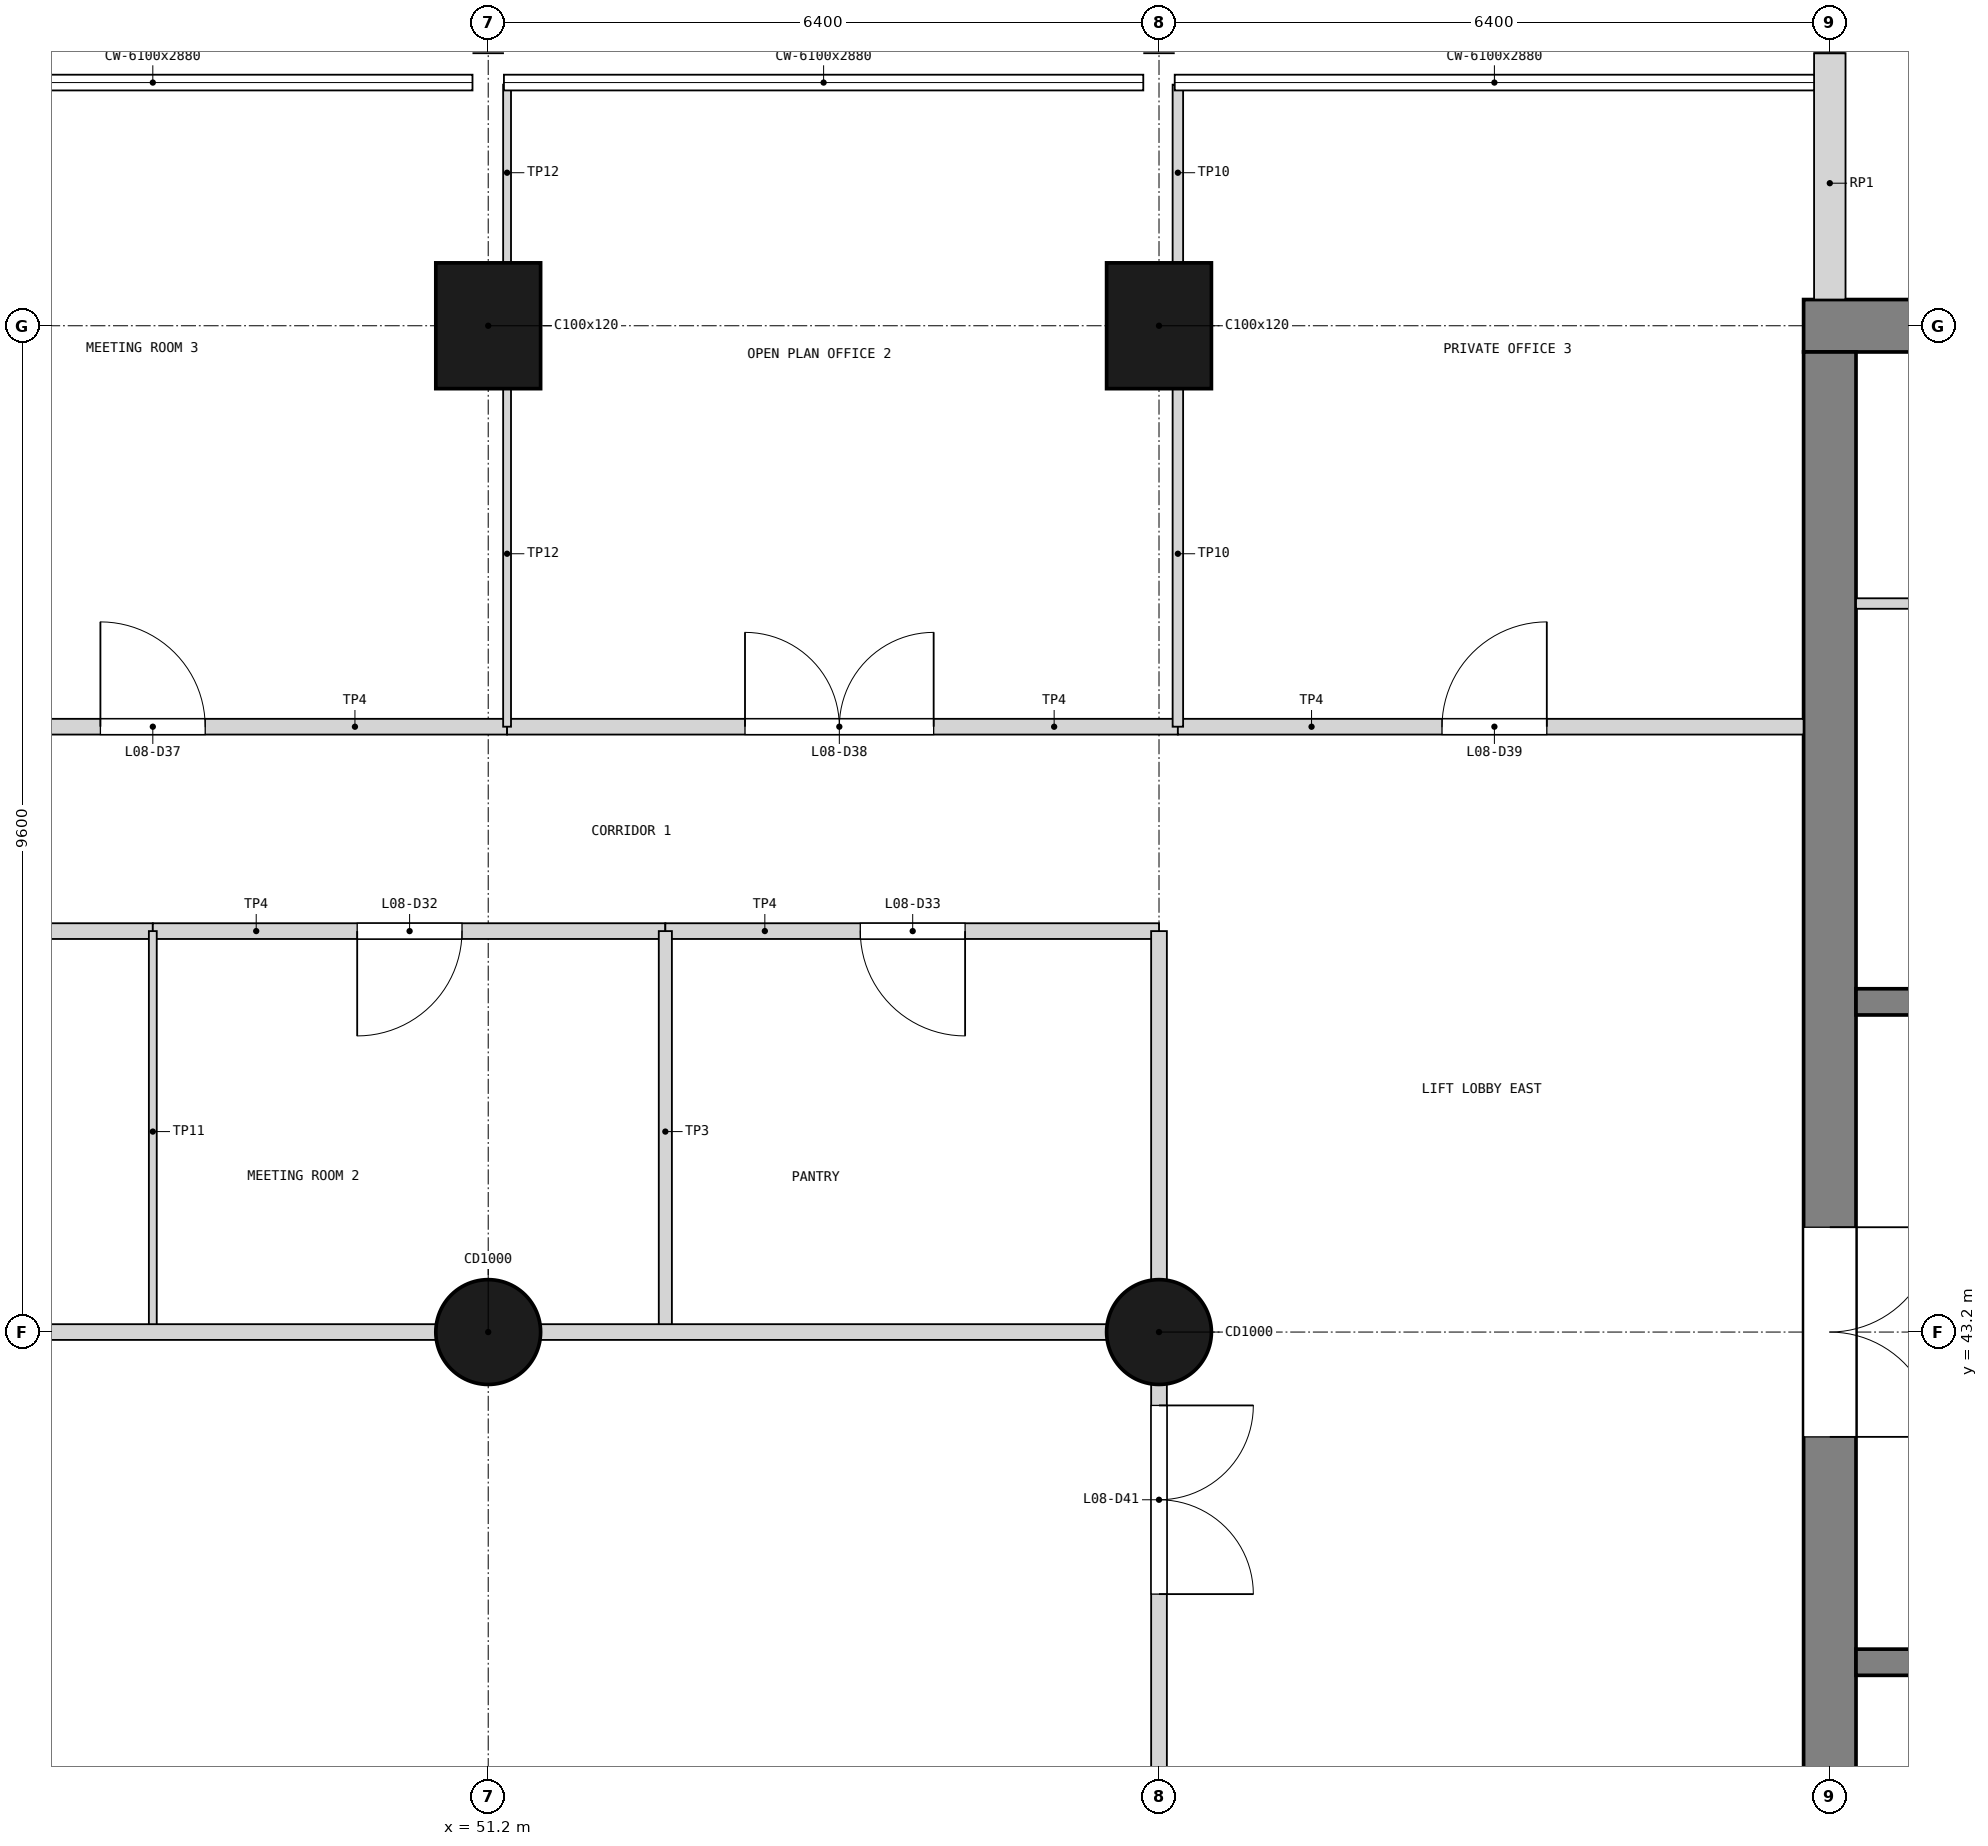
"""IFC4 building model, lengths in metres.
Left out: names, types, materials, properties, quantities, classifications, styles, units other than length and angle.
Written with IfcOpenShell. Run it as: python <this file> out.ifc"""

import sys

from ifc_helpers import new_model, si_unit, direction, frame, frame_2d, origin, origin_2d, place, context, subcontext, project, spatial, rectangle, circle, extrude, element, fill, save


model = new_model("IFC4")
c1 = context("Model", 3, precision=1e-05, world=origin(), true_north=direction((0.0, 1.0)))
c2 = subcontext(c1, "Body", "Model", "MODEL_VIEW")
j1 = project(units=[si_unit("LENGTHUNIT", "METRE"), si_unit("PLANEANGLEUNIT", "RADIAN")], contexts=[c1])
p1 = place(None, origin())
s1 = spatial("IfcSite", under=j1, at=p1, CompositionType="ELEMENT")
p2 = place(p1, origin())
s2 = spatial("IfcBuilding", under=s1, at=p2, CompositionType="ELEMENT")
p3 = place(p2, frame((0.0, 0.0, 32.7)))
s3 = spatial("IfcBuildingStorey", under=s2, at=p3, CompositionType="ELEMENT", Elevation=32.7)
p4 = place(p3, frame((63.75, 52.8, 0.0), z_axis=(0.0, 0.0, 1.0), x_axis=(1.0, 0.0, 0.0)))
e1 = element("IfcWall", 1, at=p4, inside=s3, PredefinedType="SHEAR", context=c2, shape_type="SweptSolid", body=[
    extrude(rectangle(XDim=13.3, YDim=0.5, at=frame_2d((6.65, 0.0))), origin(), (0.0, 0.0, 1.0), 3.9),
])
p5 = place(p4, frame((11.05, 0.0, 1.0)))
e2 = element("IfcOpeningElement", 2, at=p5, cuts=e1, PredefinedType="OPENING", context=c2, shape_type="SweptSolid", body=[
    extrude(rectangle(XDim=0.4, YDim=2.0, at=frame_2d((0.2, 1.0))), frame((0.0, 0.26, 0.0), z_axis=(0.0, -1.0, 0.0), x_axis=(1.0, 0.0, 0.0)), (0.0, 0.0, 1.0), 0.52),
])
p6 = place(p3, frame((64.0, 33.85, 0.0), z_axis=(0.0, 0.0, 1.0), x_axis=(0.0, 1.0, 0.0)))
e3 = element("IfcWall", 3, at=p6, inside=s3, PredefinedType="SHEAR", context=c2, shape_type="SweptSolid", body=[
    extrude(rectangle(XDim=18.7, YDim=0.5, at=frame_2d((9.35, 0.0))), origin(), (0.0, 0.0, 1.0), 3.9),
])
p7 = place(p6, frame((8.35, 0.0, 0.0)))
e4 = element("IfcOpeningElement", 4, at=p7, cuts=e3, PredefinedType="OPENING", context=c2, shape_type="SweptSolid", body=[
    extrude(rectangle(XDim=2.0, YDim=2.1, at=frame_2d((1.0, 1.05))), frame((0.0, 0.26, 0.0), z_axis=(0.0, -1.0, 0.0), x_axis=(1.0, 0.0, 0.0)), (0.0, 0.0, 1.0), 0.52),
])
p8 = place(p3, frame((51.2, 43.2, 0.0), z_axis=(0.0, 0.0, 1.0), x_axis=(1.0, 0.0, 0.0)))
e5 = element("IfcColumn", 5, at=p8, inside=s3, PredefinedType="COLUMN", context=c2, shape_type="SweptSolid", body=[
    extrude(circle(Radius=0.5, at=origin_2d()), origin(), (0.0, 0.0, 1.0), 3.9),
])
p9 = place(p3, frame((51.2, 52.8, 0.0), z_axis=(0.0, 0.0, 1.0), x_axis=(1.0, 0.0, 0.0)))
e6 = element("IfcColumn", 6, at=p9, inside=s3, PredefinedType="COLUMN", context=c2, shape_type="SweptSolid", body=[
    extrude(rectangle(XDim=1.0, YDim=1.2, at=origin_2d()), origin(), (0.0, 0.0, 1.0), 3.9),
])
p10 = place(p3, frame((57.6, 43.2, 0.0), z_axis=(0.0, 0.0, 1.0), x_axis=(1.0, 0.0, 0.0)))
e7 = element("IfcColumn", 7, at=p10, inside=s3, PredefinedType="COLUMN", context=c2, shape_type="SweptSolid", body=[
    extrude(circle(Radius=0.5, at=origin_2d()), origin(), (0.0, 0.0, 1.0), 3.9),
])
p11 = place(p3, frame((57.6, 52.8, 0.0), z_axis=(0.0, 0.0, 1.0), x_axis=(1.0, 0.0, 0.0)))
e8 = element("IfcColumn", 8, at=p11, inside=s3, PredefinedType="COLUMN", context=c2, shape_type="SweptSolid", body=[
    extrude(rectangle(XDim=1.0, YDim=1.2, at=origin_2d()), origin(), (0.0, 0.0, 1.0), 3.9),
])
p12 = place(p3, frame((64.0, 53.05, 0.0), z_axis=(0.0, 0.0, 1.0), x_axis=(0.0, 1.0, 0.0)))
e9 = element("IfcWall", 9, at=p12, inside=s3, PredefinedType="SOLIDWALL", context=c2, shape_type="SweptSolid", body=[
    extrude(rectangle(XDim=2.35, YDim=0.3, at=frame_2d((1.175, 0.0))), origin(), (0.0, 0.0, 1.0), 2.88),
])
for number, where, z_axis, x_axis in (
    (10, (69.725, 40.05, 0.0), (0.0, 0.0, 1.0), (-1.0, 0.0, 0.0)),
    (11, (69.725, 46.35, 0.0), (0.0, 0.0, 1.0), (-1.0, 0.0, 0.0)),
):
    element("IfcWall", number, at=place(p3, frame(where, z_axis=z_axis, x_axis=x_axis)), inside=s3, PredefinedType="SOLIDWALL", context=c2, shape_type="SweptSolid", body=[
        extrude(rectangle(XDim=5.475, YDim=0.25, at=frame_2d((2.738, 0.0))), origin(), (0.0, 0.0, 1.0), 3.6),
    ])
p13 = place(p3, frame((69.475, 50.15, 0.0), z_axis=(0.0, 0.0, 1.0), x_axis=(-1.0, 0.0, 0.0)))
e12 = element("IfcWall", 12, at=p13, inside=s3, PredefinedType="PARTITIONING", context=c2, shape_type="SweptSolid", body=[
    extrude(rectangle(XDim=5.225, YDim=0.1, at=frame_2d((2.613, 0.0))), origin(), (0.0, 0.0, 1.0), 3.6),
])
p14 = place(p3, frame((41.6, 47.025, 0.0), z_axis=(0.0, 0.0, 1.0), x_axis=(1.0, 0.0, 0.0)))
e13 = element("IfcWall", 13, at=p14, inside=s3, PredefinedType="PARTITIONING", context=c2, shape_type="SweptSolid", body=[
    extrude(rectangle(XDim=6.4, YDim=0.15, at=frame_2d((3.2, 0.0))), origin(), (0.0, 0.0, 1.0), 3.68),
])
p15 = place(p14, frame((2.7, 0.0, 0.0)))
e14 = element("IfcOpeningElement", 14, at=p15, cuts=e13, PredefinedType="OPENING", context=c2, shape_type="SweptSolid", body=[
    extrude(rectangle(XDim=1.0, YDim=2.1, at=frame_2d((0.5, 1.05))), frame((0.0, 0.085, 0.0), z_axis=(0.0, -1.0, 0.0), x_axis=(1.0, 0.0, 0.0)), (0.0, 0.0, 1.0), 0.17),
])
p16 = place(p3, frame((48.0, 47.025, 0.0), z_axis=(0.0, 0.0, 1.0), x_axis=(1.0, 0.0, 0.0)))
e15 = element("IfcWall", 15, at=p16, inside=s3, PredefinedType="PARTITIONING", context=c2, shape_type="SweptSolid", body=[
    extrude(rectangle(XDim=4.89, YDim=0.15, at=frame_2d((2.445, 0.0))), origin(), (0.0, 0.0, 1.0), 3.68),
])
p17 = place(p16, frame((1.95, 0.0, 0.0)))
e16 = element("IfcOpeningElement", 16, at=p17, cuts=e15, PredefinedType="OPENING", context=c2, shape_type="SweptSolid", body=[
    extrude(rectangle(XDim=1.0, YDim=2.1, at=frame_2d((0.5, 1.05))), frame((0.0, 0.085, 0.0), z_axis=(0.0, -1.0, 0.0), x_axis=(1.0, 0.0, 0.0)), (0.0, 0.0, 1.0), 0.17),
])
p18 = place(p3, frame((52.89, 47.025, 0.0), z_axis=(0.0, 0.0, 1.0), x_axis=(1.0, 0.0, 0.0)))
e17 = element("IfcWall", 17, at=p18, inside=s3, PredefinedType="PARTITIONING", context=c2, shape_type="SweptSolid", body=[
    extrude(rectangle(XDim=4.71, YDim=0.15, at=frame_2d((2.355, 0.0))), origin(), (0.0, 0.0, 1.0), 3.68),
])
p19 = place(p18, frame((1.86, 0.0, 0.0)))
e18 = element("IfcOpeningElement", 18, at=p19, cuts=e17, PredefinedType="OPENING", context=c2, shape_type="SweptSolid", body=[
    extrude(rectangle(XDim=1.0, YDim=2.1, at=frame_2d((0.5, 1.05))), frame((0.0, 0.085, 0.0), z_axis=(0.0, -1.0, 0.0), x_axis=(1.0, 0.0, 0.0)), (0.0, 0.0, 1.0), 0.17),
])
p20 = place(p3, frame((48.0, 43.2, 0.0), z_axis=(0.0, 0.0, 1.0), x_axis=(0.0, 1.0, 0.0)))
e19 = element("IfcWall", 19, at=p20, inside=s3, PredefinedType="PARTITIONING", context=c2, shape_type="SweptSolid", body=[
    extrude(rectangle(XDim=3.825, YDim=0.075, at=frame_2d((1.913, 0.0))), origin(), (0.0, 0.0, 1.0), 3.08),
])
p21 = place(p3, frame((52.89, 43.2, 0.0), z_axis=(0.0, 0.0, 1.0), x_axis=(0.0, 1.0, 0.0)))
e20 = element("IfcWall", 20, at=p21, inside=s3, PredefinedType="PARTITIONING", context=c2, shape_type="SweptSolid", body=[
    extrude(rectangle(XDim=3.825, YDim=0.125, at=frame_2d((1.913, 0.0))), origin(), (0.0, 0.0, 1.0), 3.68),
])
p22 = place(p3, frame((44.62, 48.975, 0.0), z_axis=(0.0, 0.0, 1.0), x_axis=(1.0, 0.0, 0.0)))
e21 = element("IfcWall", 21, at=p22, inside=s3, PredefinedType="PARTITIONING", context=c2, shape_type="SweptSolid", body=[
    extrude(rectangle(XDim=6.76, YDim=0.15, at=frame_2d((3.38, 0.0))), origin(), (0.0, 0.0, 1.0), 3.68),
])
p23 = place(p22, frame((2.88, 0.0, 0.0)))
e22 = element("IfcOpeningElement", 22, at=p23, cuts=e21, PredefinedType="OPENING", context=c2, shape_type="SweptSolid", body=[
    extrude(rectangle(XDim=1.0, YDim=2.1, at=frame_2d((0.5, 1.05))), frame((0.0, 0.085, 0.0), z_axis=(0.0, -1.0, 0.0), x_axis=(1.0, 0.0, 0.0)), (0.0, 0.0, 1.0), 0.17),
])
p24 = place(p3, frame((51.38, 48.975, 0.0), z_axis=(0.0, 0.0, 1.0), x_axis=(1.0, 0.0, 0.0)))
e23 = element("IfcWall", 23, at=p24, inside=s3, PredefinedType="PARTITIONING", context=c2, shape_type="SweptSolid", body=[
    extrude(rectangle(XDim=6.4, YDim=0.15, at=frame_2d((3.2, 0.0))), origin(), (0.0, 0.0, 1.0), 3.68),
])
p25 = place(p24, frame((2.27, 0.0, 0.0)))
e24 = element("IfcOpeningElement", 24, at=p25, cuts=e23, PredefinedType="OPENING", context=c2, shape_type="SweptSolid", body=[
    extrude(rectangle(XDim=1.8, YDim=2.1, at=frame_2d((0.9, 1.05))), frame((0.0, 0.085, 0.0), z_axis=(0.0, -1.0, 0.0), x_axis=(1.0, 0.0, 0.0)), (0.0, 0.0, 1.0), 0.17),
])
p26 = place(p3, frame((57.78, 48.975, 0.0), z_axis=(0.0, 0.0, 1.0), x_axis=(1.0, 0.0, 0.0)))
e25 = element("IfcWall", 25, at=p26, inside=s3, PredefinedType="PARTITIONING", context=c2, shape_type="SweptSolid", body=[
    extrude(rectangle(XDim=5.97, YDim=0.15, at=frame_2d((2.985, 0.0))), origin(), (0.0, 0.0, 1.0), 3.68),
])
p27 = place(p26, frame((2.52, 0.0, 0.0)))
e26 = element("IfcOpeningElement", 26, at=p27, cuts=e25, PredefinedType="OPENING", context=c2, shape_type="SweptSolid", body=[
    extrude(rectangle(XDim=1.0, YDim=2.1, at=frame_2d((0.5, 1.05))), frame((0.0, 0.085, 0.0), z_axis=(0.0, -1.0, 0.0), x_axis=(1.0, 0.0, 0.0)), (0.0, 0.0, 1.0), 0.17),
])
p28 = place(p3, frame((51.38, 48.975, 0.0), z_axis=(0.0, 0.0, 1.0), x_axis=(0.0, 1.0, 0.0)))
e27 = element("IfcWall", 27, at=p28, inside=s3, PredefinedType="PARTITIONING", context=c2, shape_type="SweptSolid", body=[
    extrude(rectangle(XDim=3.245, YDim=0.075, at=frame_2d((1.623, 0.0))), origin(), (0.0, 0.0, 1.0), 2.78),
])
p29 = place(p3, frame((51.38, 53.38, 0.0), z_axis=(0.0, 0.0, 1.0), x_axis=(0.0, 1.0, 0.0)))
e28 = element("IfcWall", 28, at=p29, inside=s3, PredefinedType="PARTITIONING", context=c2, shape_type="SweptSolid", body=[
    extrude(rectangle(XDim=1.72, YDim=0.075, at=frame_2d((0.86, 0.0))), origin(), (0.0, 0.0, 1.0), 2.78),
])
p30 = place(p3, frame((57.78, 48.975, 0.0), z_axis=(0.0, 0.0, 1.0), x_axis=(0.0, 1.0, 0.0)))
e29 = element("IfcWall", 29, at=p30, inside=s3, PredefinedType="PARTITIONING", context=c2, shape_type="SweptSolid", body=[
    extrude(rectangle(XDim=3.245, YDim=0.1, at=frame_2d((1.623, 0.0))), origin(), (0.0, 0.0, 1.0), 2.78),
])
p31 = place(p3, frame((57.78, 53.38, 0.0), z_axis=(0.0, 0.0, 1.0), x_axis=(0.0, 1.0, 0.0)))
e30 = element("IfcWall", 30, at=p31, inside=s3, PredefinedType="PARTITIONING", context=c2, shape_type="SweptSolid", body=[
    extrude(rectangle(XDim=1.72, YDim=0.1, at=frame_2d((0.86, 0.0))), origin(), (0.0, 0.0, 1.0), 2.78),
])
p32 = place(p3, frame((57.6, 33.6, 0.0), z_axis=(0.0, 0.0, 1.0), x_axis=(0.0, 1.0, 0.0)))
e31 = element("IfcWall", 31, at=p32, inside=s3, PredefinedType="PARTITIONING", context=c2, shape_type="SweptSolid", body=[
    extrude(rectangle(XDim=13.425, YDim=0.15, at=frame_2d((6.712, 0.0))), origin(), (0.0, 0.0, 1.0), 2.78),
])
p33 = place(p32, frame((7.1, 0.0, 0.0)))
e32 = element("IfcOpeningElement", 32, at=p33, cuts=e31, PredefinedType="OPENING", context=c2, shape_type="SweptSolid", body=[
    extrude(rectangle(XDim=1.8, YDim=2.1, at=frame_2d((0.9, 1.05))), frame((0.0, 0.085, 0.0), z_axis=(0.0, -1.0, 0.0), x_axis=(1.0, 0.0, 0.0)), (0.0, 0.0, 1.0), 0.17),
])
p34 = place(p3, frame((32.0, 43.2, 0.0), z_axis=(0.0, 0.0, 1.0), x_axis=(1.0, 0.0, 0.0)))
e33 = element("IfcWall", 33, at=p34, inside=s3, PredefinedType="PARTITIONING", context=c2, shape_type="SweptSolid", body=[
    extrude(rectangle(XDim=25.6, YDim=0.15, at=frame_2d((12.8, 0.0))), origin(), (0.0, 0.0, 1.0), 2.88),
])
p35 = place(p7, frame((2.0, 0.0, 0.0), z_axis=(0.0, 0.0, 1.0), x_axis=(-1.0, 0.0, 0.0)))
e34 = element("IfcDoor", 34, at=p35, inside=s3, OperationType="DOUBLE_DOOR_SINGLE_SWING", PredefinedType="DOOR", context=c2, shape_type="SweptSolid", body=[
    extrude(rectangle(XDim=2.0, YDim=2.1, at=frame_2d((1.0, 1.05))), frame((0.0, 0.025, 0.0), z_axis=(0.0, -1.0, 0.0), x_axis=(1.0, 0.0, 0.0)), (0.0, 0.0, 1.0), 0.05),
])
fill(e4, e34)
p36 = place(p17, frame((1.0, 0.0, 0.0), z_axis=(0.0, 0.0, 1.0), x_axis=(-1.0, 0.0, 0.0)))
e35 = element("IfcDoor", 35, at=p36, inside=s3, OperationType="SINGLE_SWING_RIGHT", PredefinedType="DOOR", context=c2, shape_type="SweptSolid", body=[
    extrude(rectangle(XDim=1.0, YDim=2.1, at=frame_2d((0.5, 1.05))), frame((0.0, 0.025, 0.0), z_axis=(0.0, -1.0, 0.0), x_axis=(1.0, 0.0, 0.0)), (0.0, 0.0, 1.0), 0.05),
])
fill(e16, e35)
p37 = place(p19, frame((1.0, 0.0, 0.0), z_axis=(0.0, 0.0, 1.0), x_axis=(-1.0, 0.0, 0.0)))
e36 = element("IfcDoor", 36, at=p37, inside=s3, OperationType="SINGLE_SWING_LEFT", PredefinedType="DOOR", context=c2, shape_type="SweptSolid", body=[
    extrude(rectangle(XDim=1.0, YDim=2.1, at=frame_2d((0.5, 1.05))), frame((0.0, 0.025, 0.0), z_axis=(0.0, -1.0, 0.0), x_axis=(1.0, 0.0, 0.0)), (0.0, 0.0, 1.0), 0.05),
])
fill(e18, e36)
p38 = place(p23, origin())
e37 = element("IfcDoor", 37, at=p38, inside=s3, OperationType="SINGLE_SWING_LEFT", PredefinedType="DOOR", context=c2, shape_type="SweptSolid", body=[
    extrude(rectangle(XDim=1.0, YDim=2.1, at=frame_2d((0.5, 1.05))), frame((0.0, 0.025, 0.0), z_axis=(0.0, -1.0, 0.0), x_axis=(1.0, 0.0, 0.0)), (0.0, 0.0, 1.0), 0.05),
])
fill(e22, e37)
p39 = place(p25, origin())
e38 = element("IfcDoor", 38, at=p39, inside=s3, OperationType="DOUBLE_DOOR_SINGLE_SWING", PredefinedType="DOOR", context=c2, shape_type="SweptSolid", body=[
    extrude(rectangle(XDim=1.8, YDim=2.1, at=frame_2d((0.9, 1.05))), frame((0.0, 0.025, 0.0), z_axis=(0.0, -1.0, 0.0), x_axis=(1.0, 0.0, 0.0)), (0.0, 0.0, 1.0), 0.05),
])
fill(e24, e38)
p40 = place(p27, origin())
e39 = element("IfcDoor", 39, at=p40, inside=s3, OperationType="SINGLE_SWING_RIGHT", PredefinedType="DOOR", context=c2, shape_type="SweptSolid", body=[
    extrude(rectangle(XDim=1.0, YDim=2.1, at=frame_2d((0.5, 1.05))), frame((0.0, 0.025, 0.0), z_axis=(0.0, -1.0, 0.0), x_axis=(1.0, 0.0, 0.0)), (0.0, 0.0, 1.0), 0.05),
])
fill(e26, e39)
p41 = place(p33, frame((1.8, 0.0, 0.0), z_axis=(0.0, 0.0, 1.0), x_axis=(-1.0, 0.0, 0.0)))
e40 = element("IfcDoor", 40, at=p41, inside=s3, OperationType="DOUBLE_DOOR_SINGLE_SWING", PredefinedType="DOOR", context=c2, shape_type="SweptSolid", body=[
    extrude(rectangle(XDim=1.8, YDim=2.1, at=frame_2d((0.9, 1.05))), frame((0.0, 0.025, 0.0), z_axis=(0.0, -1.0, 0.0), x_axis=(1.0, 0.0, 0.0)), (0.0, 0.0, 1.0), 0.05),
])
fill(e32, e40)
save(model, sys.argv[1])
